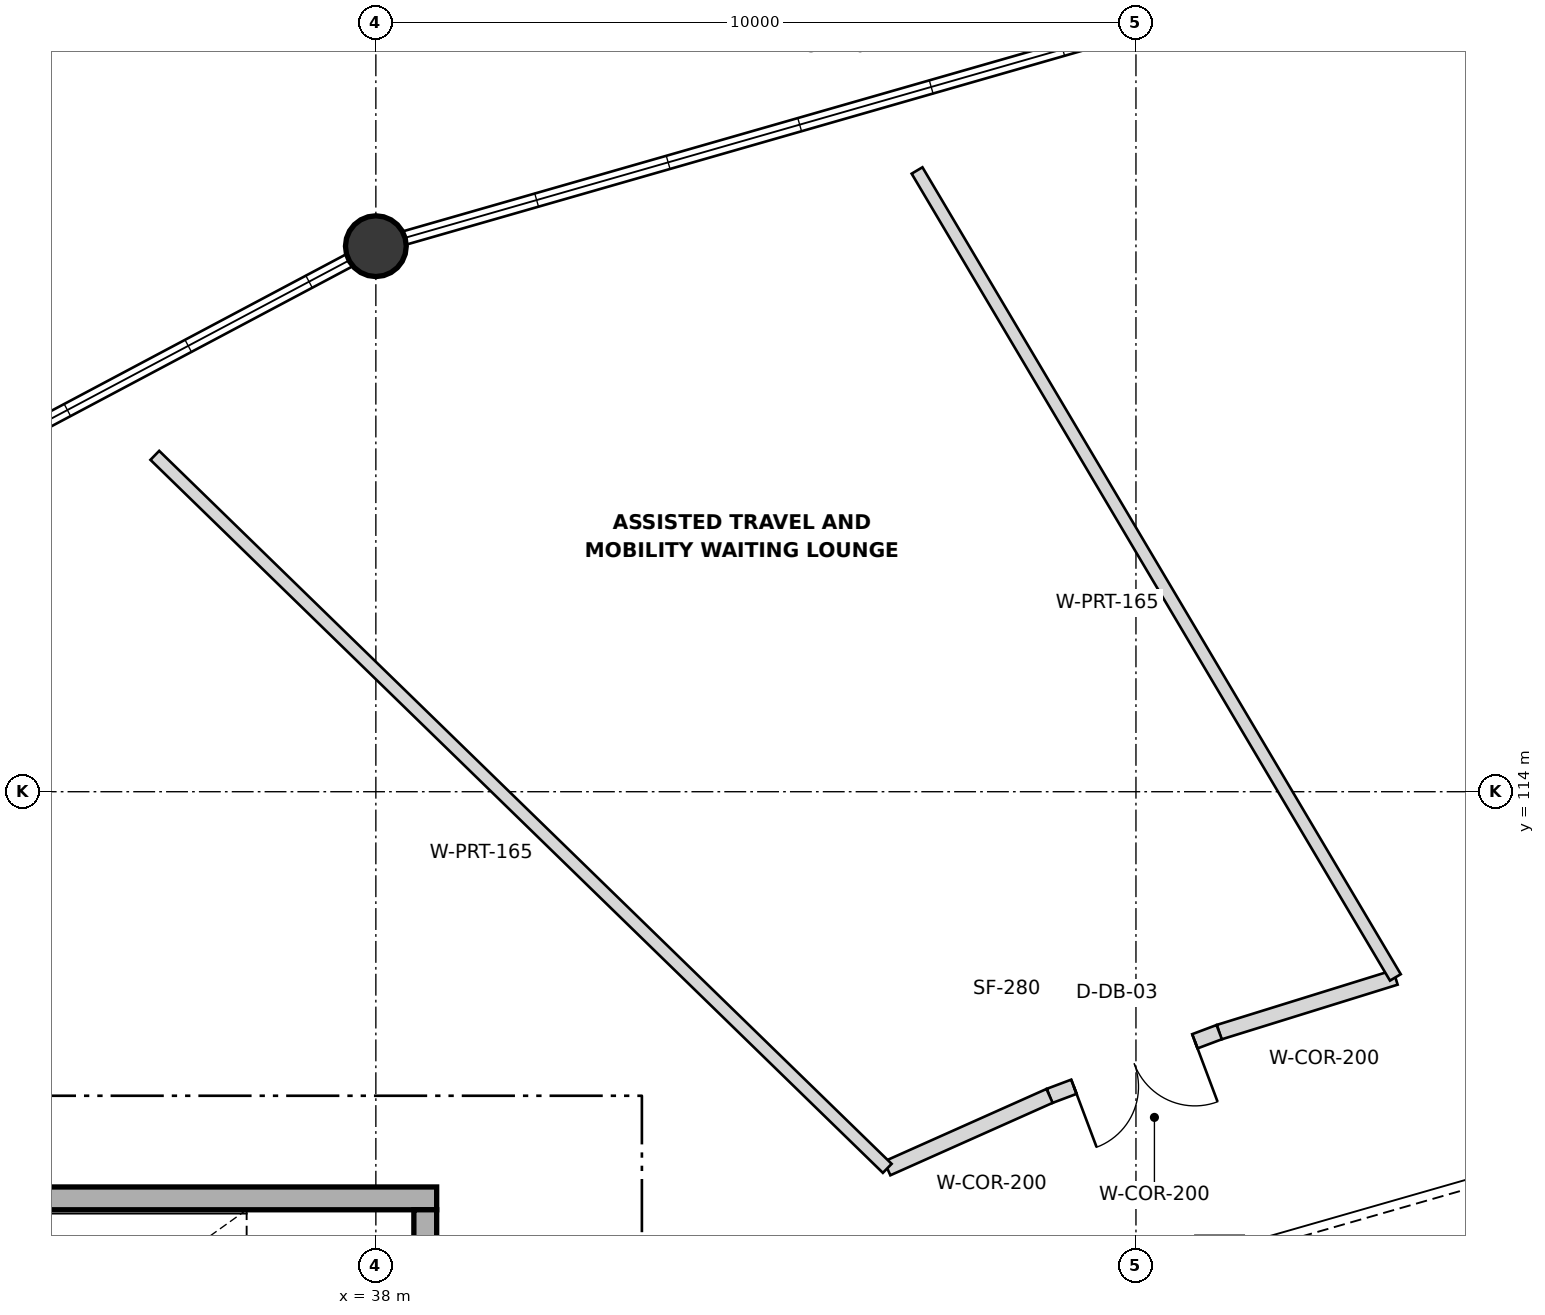
"""IFC4 building model, lengths in metres.
Left out: names, types, materials, properties, quantities, classifications, styles, units other than length and angle.
Written with IfcOpenShell. Run it as: python <this file> out.ifc"""

import sys

from ifc_helpers import new_model, si_unit, direction, frame, frame_2d, origin, origin_2d, place, context, subcontext, project, spatial, rectangle, circle, extrude, element, fill, save


model = new_model("IFC4")
c1 = context("Model", 3, precision=1e-05, world=origin(), true_north=direction((0.0, 1.0)))
c2 = subcontext(c1, "Body", "Model", "MODEL_VIEW")
j1 = project(units=[si_unit("LENGTHUNIT", "METRE"), si_unit("PLANEANGLEUNIT", "RADIAN")], contexts=[c1])
p1 = place(None, origin())
s1 = spatial("IfcSite", under=j1, at=p1, CompositionType="ELEMENT")
p2 = place(p1, origin())
s2 = spatial("IfcBuilding", under=s1, at=p2, CompositionType="ELEMENT")
p3 = place(p2, frame((0.0, 0.0, 5.4)))
s3 = spatial("IfcBuildingStorey", under=s2, at=p3, CompositionType="ELEMENT", Elevation=5.4)
p4 = place(p3, frame((38.0, 121.177, 0.0), z_axis=(0.0, 0.0, 1.0), x_axis=(1.0, 0.0, 0.0)))
e1 = element("IfcColumn", 1, at=p4, inside=s3, PredefinedType="COLUMN", context=c2, shape_type="SweptSolid", body=[
    extrude(circle(Radius=0.4, at=origin_2d()), origin(), (0.0, 0.0, 1.0), 4.2),
])
p5 = place(p3, frame((29.6, 108.65, 0.0), z_axis=(0.0, 0.0, 1.0), x_axis=(1.0, 0.0, 0.0)))
e2 = element("IfcWall", 2, at=p5, inside=s3, PredefinedType="SHEAR", context=c2, shape_type="SweptSolid", body=[
    extrude(rectangle(XDim=9.2, YDim=0.3, at=frame_2d((4.6, 0.0))), origin(), (0.0, 0.0, 1.0), 4.2),
])
p6 = place(p3, frame((38.65, 108.5, 0.0), z_axis=(0.0, 0.0, 1.0), x_axis=(0.0, -1.0, 0.0)))
e3 = element("IfcWall", 3, at=p6, inside=s3, PredefinedType="SHEAR", context=c2, shape_type="SweptSolid", body=[
    extrude(rectangle(XDim=4.58, YDim=0.3, at=frame_2d((2.29, 0.0))), origin(), (0.0, 0.0, 1.0), 4.2),
])
p7 = place(p6, frame((1.565, 0.0, 0.0)))
e4 = element("IfcOpeningElement", 4, at=p7, cuts=e3, PredefinedType="OPENING", context=c2, shape_type="SweptSolid", body=[
    extrude(rectangle(XDim=1.45, YDim=2.2, at=frame_2d((0.725, 1.1))), frame((0.0, 0.16, 0.0), z_axis=(0.0, -1.0, 0.0), x_axis=(1.0, 0.0, 0.0)), (0.0, 0.0, 1.0), 0.32),
])
p8 = place(p3, frame((51.413, 111.557, 0.0), z_axis=(0.0, 0.0, 1.0), x_axis=(-0.954999315688, -0.296608002313, 0.0)))
e5 = element("IfcWall", 5, at=p8, inside=s3, PredefinedType="PARTITIONING", context=c2, shape_type="SweptSolid", body=[
    extrude(rectangle(XDim=2.427, YDim=0.2, at=frame_2d((1.214, 0.0))), origin(), (0.0, 0.0, 1.0), 3.1),
])
p9 = place(p3, frame((49.095, 110.837, 0.0), z_axis=(0.0, 0.0, 1.0), x_axis=(-0.936068029803, -0.351819049486, 0.0)))
e6 = element("IfcWall", 6, at=p9, inside=s3, PredefinedType="PARTITIONING", context=c2, shape_type="SweptSolid", body=[
    extrude(rectangle(XDim=2.384, YDim=0.2, at=frame_2d((1.192, 0.0))), origin(), (0.0, 0.0, 1.0), 3.1),
])
p10 = place(p9, frame((0.342, 0.0, 0.0)))
e7 = element("IfcOpeningElement", 7, at=p10, cuts=e6, PredefinedType="OPENING", context=c2, shape_type="SweptSolid", body=[
    extrude(rectangle(XDim=1.7, YDim=2.2, at=frame_2d((0.85, 1.1))), frame((0.0, 0.11, 0.0), z_axis=(0.0, -1.0, 0.0), x_axis=(1.0, 0.0, 0.0)), (0.0, 0.0, 1.0), 0.22),
])
p11 = place(p3, frame((46.863, 109.998, 0.0), z_axis=(0.0, 0.0, 1.0), x_axis=(-0.913138576523, -0.40764928562, 0.0)))
e8 = element("IfcWall", 8, at=p11, inside=s3, PredefinedType="PARTITIONING", context=c2, shape_type="SweptSolid", body=[
    extrude(rectangle(XDim=2.338, YDim=0.2, at=frame_2d((1.169, 0.0))), origin(), (0.0, 0.0, 1.0), 3.1),
])
p12 = place(p3, frame((51.413, 111.557, 0.0), z_axis=(0.0, 0.0, 1.0), x_axis=(-0.509915176618, 0.860224687308, 0.0)))
e9 = element("IfcWall", 9, at=p12, inside=s3, PredefinedType="PARTITIONING", context=c2, shape_type="SweptSolid", body=[
    extrude(rectangle(XDim=12.341, YDim=0.165, at=frame_2d((6.171, 0.0))), origin(), (0.0, 0.0, 1.0), 3.1),
])
p13 = place(p3, frame((44.728, 109.045, 0.0), z_axis=(0.0, 0.0, 1.0), x_axis=(-0.716555955186, 0.697529614488, 0.0)))
e10 = element("IfcWall", 10, at=p13, inside=s3, PredefinedType="PARTITIONING", context=c2, shape_type="SweptSolid", body=[
    extrude(rectangle(XDim=13.448, YDim=0.165, at=frame_2d((6.724, 0.0))), origin(), (0.0, 0.0, 1.0), 3.1),
])
p14 = place(p10, origin())
e11 = element("IfcDoor", 11, at=p14, inside=s3, OperationType="DOUBLE_DOOR_SINGLE_SWING", PredefinedType="DOOR", context=c2, shape_type="SweptSolid", body=[
    extrude(rectangle(XDim=1.7, YDim=2.2, at=frame_2d((0.85, 1.1))), frame((0.0, 0.025, 0.0), z_axis=(0.0, -1.0, 0.0), x_axis=(1.0, 0.0, 0.0)), (0.0, 0.0, 1.0), 0.05),
])
fill(e7, e11)
save(model, sys.argv[1])
